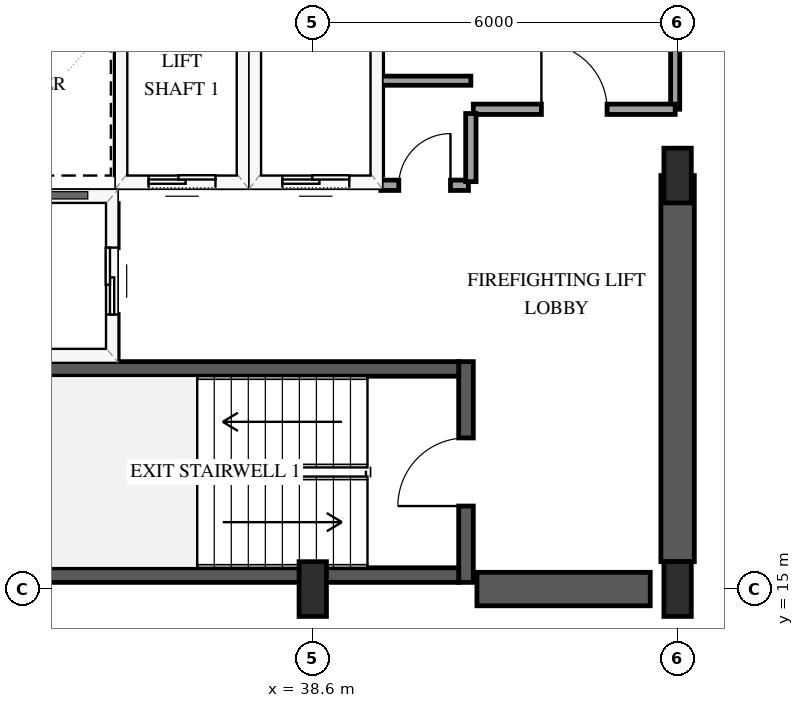
"""IFC4 building model, lengths in metres.
Left out: names, types, materials, properties, quantities, classifications, styles, units other than length and angle.
Written with IfcOpenShell. Run it as: python <this file> out.ifc"""

import sys

from ifc_helpers import new_model, si_unit, direction, frame, frame_2d, origin, origin_2d, place, context, subcontext, project, spatial, rectangle, extrude, element, fill, save


model = new_model("IFC4")
c1 = context("Model", 3, precision=1e-05, world=origin(), true_north=direction((0.0, 1.0)))
c2 = subcontext(c1, "Body", "Model", "MODEL_VIEW")
j1 = project(units=[si_unit("LENGTHUNIT", "METRE"), si_unit("PLANEANGLEUNIT", "RADIAN")], contexts=[c1])
p1 = place(None, origin())
s1 = spatial("IfcSite", under=j1, at=p1, CompositionType="ELEMENT")
p2 = place(p1, origin())
s2 = spatial("IfcBuilding", under=s1, at=p2, CompositionType="ELEMENT")
p3 = place(p2, frame((0.0, 0.0, 95.2)))
s3 = spatial("IfcBuildingStorey", under=s2, at=p3, CompositionType="ELEMENT", Elevation=95.2)
p4 = place(p3, frame((41.12, 15.11, 0.0), z_axis=(0.0, 0.0, 1.0), x_axis=(0.0, 1.0, 0.0)))
e1 = element("IfcWall", 1, at=p4, inside=s3, PredefinedType="SHEAR", context=c2, shape_type="SweptSolid", body=[
    extrude(rectangle(XDim=3.63, YDim=0.24, at=frame_2d((1.815, 0.0))), origin(), (0.0, 0.0, 1.0), 3.9),
])
p5 = place(p4, frame((1.255, 0.0, 0.0)))
e2 = element("IfcOpeningElement", 2, at=p5, cuts=e1, PredefinedType="OPENING", context=c2, shape_type="SweptSolid", body=[
    extrude(rectangle(XDim=1.12, YDim=2.15, at=frame_2d((0.56, 1.075))), frame((0.0, 0.13, 0.0), z_axis=(0.0, -1.0, 0.0), x_axis=(1.0, 0.0, 0.0)), (0.0, 0.0, 1.0), 0.26),
])
for number, where, z_axis, x_axis in (
    (3, (33.0, 15.23, 0.0), (0.0, 0.0, 1.0), (1.0, 0.0, 0.0)),
    (4, (33.0, 18.62, 0.0), (0.0, 0.0, 1.0), (1.0, 0.0, 0.0)),
):
    element("IfcWall", number, at=place(p3, frame(where, z_axis=z_axis, x_axis=x_axis)), inside=s3, PredefinedType="SHEAR", context=c2, shape_type="SweptSolid", body=[
        extrude(rectangle(XDim=8.0, YDim=0.24, at=frame_2d((4.0, 0.0))), origin(), (0.0, 0.0, 1.0), 3.9),
    ])
p6 = place(p3, frame((41.3, 15.0, 0.0), z_axis=(0.0, 0.0, 1.0), x_axis=(1.0, 0.0, 0.0)))
e5 = element("IfcWall", 5, at=p6, inside=s3, PredefinedType="SHEAR", context=c2, shape_type="SweptSolid", body=[
    extrude(rectangle(XDim=2.85, YDim=0.55, at=frame_2d((1.425, 0.0))), origin(), (0.0, 0.0, 1.0), 3.9),
])
p7 = place(p3, frame((44.6, 15.45, 0.0), z_axis=(0.0, 0.0, 1.0), x_axis=(0.0, 1.0, 0.0)))
e6 = element("IfcWall", 6, at=p7, inside=s3, PredefinedType="SHEAR", context=c2, shape_type="SweptSolid", body=[
    extrude(rectangle(XDim=6.35, YDim=0.55, at=frame_2d((3.175, 0.0))), origin(), (0.0, 0.0, 1.0), 3.9),
])
for number, where, z_axis, x_axis in (
    (7, (38.6, 15.0, 0.0), (0.0, 0.0, 1.0), (1.0, 0.0, 0.0)),
    (8, (44.6, 15.0, 0.0), (0.0, 0.0, 1.0), (1.0, 0.0, 0.0)),
    (9, (44.6, 21.8, 0.0), (0.0, 0.0, 1.0), (1.0, 0.0, 0.0)),
):
    element("IfcColumn", number, at=place(p3, frame(where, z_axis=z_axis, x_axis=x_axis)), inside=s3, PredefinedType="PILASTER", context=c2, shape_type="SweptSolid", body=[
        extrude(rectangle(XDim=0.45, YDim=0.9, at=origin_2d()), origin(), (0.0, 0.0, 1.0), 3.9),
    ])
p8 = place(p3, frame((35.45, 21.7, 0.0), z_axis=(0.0, 0.0, 1.0), x_axis=(1.0, 0.0, 0.0)))
e10 = element("IfcWall", 10, at=p8, inside=s3, PredefinedType="SOLIDWALL", context=c2, shape_type="SweptSolid", body=[
    extrude(rectangle(XDim=2.0, YDim=0.2, at=frame_2d((1.0, 0.0))), origin(), (0.0, 0.0, 1.0), 3.6),
])
p9 = place(p8, frame((0.45, 0.0, 0.0)))
e11 = element("IfcOpeningElement", 11, at=p9, cuts=e10, PredefinedType="OPENING", context=c2, shape_type="SweptSolid", body=[
    extrude(rectangle(XDim=1.1, YDim=2.15, at=frame_2d((0.55, 1.075))), frame((0.0, 0.11, 0.0), z_axis=(0.0, -1.0, 0.0), x_axis=(1.0, 0.0, 0.0)), (0.0, 0.0, 1.0), 0.22),
])
for number, where, z_axis, x_axis in (
    (12, (35.45, 21.81, 0.0), (0.0, 0.0, 1.0), (0.0, 1.0, 0.0)),
    (13, (37.45, 21.81, 0.0), (0.0, 0.0, 1.0), (0.0, 1.0, 0.0)),
):
    element("IfcWall", number, at=place(p3, frame(where, z_axis=z_axis, x_axis=x_axis)), inside=s3, PredefinedType="SOLIDWALL", context=c2, shape_type="SweptSolid", body=[
        extrude(rectangle(XDim=2.38, YDim=0.2, at=frame_2d((1.19, 0.0))), origin(), (0.0, 0.0, 1.0), 3.6),
    ])
p10 = place(p3, frame((37.65, 21.7, 0.0), z_axis=(0.0, 0.0, 1.0), x_axis=(1.0, 0.0, 0.0)))
e14 = element("IfcWall", 14, at=p10, inside=s3, PredefinedType="SOLIDWALL", context=c2, shape_type="SweptSolid", body=[
    extrude(rectangle(XDim=2.0, YDim=0.2, at=frame_2d((1.0, 0.0))), origin(), (0.0, 0.0, 1.0), 3.6),
])
p11 = place(p10, frame((0.45, 0.0, 0.0)))
e15 = element("IfcOpeningElement", 15, at=p11, cuts=e14, PredefinedType="OPENING", context=c2, shape_type="SweptSolid", body=[
    extrude(rectangle(XDim=1.1, YDim=2.15, at=frame_2d((0.55, 1.075))), frame((0.0, 0.11, 0.0), z_axis=(0.0, -1.0, 0.0), x_axis=(1.0, 0.0, 0.0)), (0.0, 0.0, 1.0), 0.22),
])
p12 = place(p3, frame((39.65, 21.81, 0.0), z_axis=(0.0, 0.0, 1.0), x_axis=(0.0, 1.0, 0.0)))
e16 = element("IfcWall", 16, at=p12, inside=s3, PredefinedType="SOLIDWALL", context=c2, shape_type="SweptSolid", body=[
    extrude(rectangle(XDim=2.38, YDim=0.2, at=frame_2d((1.19, 0.0))), origin(), (0.0, 0.0, 1.0), 3.6),
])
p13 = place(p3, frame((32.72, 21.45, 0.0), z_axis=(0.0, 0.0, 1.0), x_axis=(1.0, 0.0, 0.0)))
e17 = element("IfcWall", 17, at=p13, inside=s3, PredefinedType="SOLIDWALL", context=c2, shape_type="SweptSolid", body=[
    extrude(rectangle(XDim=2.58, YDim=0.2, at=frame_2d((1.29, 0.0))), origin(), (0.0, 0.0, 1.0), 3.6),
])
p14 = place(p3, frame((35.3, 18.79, 0.0), z_axis=(0.0, 0.0, 1.0), x_axis=(0.0, 1.0, 0.0)))
e18 = element("IfcWall", 18, at=p14, inside=s3, PredefinedType="SOLIDWALL", context=c2, shape_type="SweptSolid", body=[
    extrude(rectangle(XDim=2.55, YDim=0.2, at=frame_2d((1.275, 0.0))), origin(), (0.0, 0.0, 1.0), 3.6),
])
p15 = place(p14, frame((0.725, 0.0, 0.0)))
e19 = element("IfcOpeningElement", 19, at=p15, cuts=e18, PredefinedType="OPENING", context=c2, shape_type="SweptSolid", body=[
    extrude(rectangle(XDim=1.1, YDim=2.15, at=frame_2d((0.55, 1.075))), frame((0.0, 0.11, 0.0), z_axis=(0.0, -1.0, 0.0), x_axis=(1.0, 0.0, 0.0)), (0.0, 0.0, 1.0), 0.22),
])
p16 = place(p3, frame((44.56, 29.8, 0.0), z_axis=(0.0, 0.0, 1.0), x_axis=(0.0, -1.0, 0.0)))
e20 = element("IfcWall", 20, at=p16, inside=s3, PredefinedType="PARTITIONING", context=c2, shape_type="SweptSolid", body=[
    extrude(rectangle(XDim=6.91, YDim=0.15, at=frame_2d((3.455, 0.0))), origin(), (0.0, 0.0, 1.0), 2.64),
])
p17 = place(p16, frame((2.915, 0.0, 0.0)))
e21 = element("IfcOpeningElement", 21, at=p17, cuts=e20, PredefinedType="OPENING", context=c2, shape_type="SweptSolid", body=[
    extrude(rectangle(XDim=1.08, YDim=2.15, at=frame_2d((0.54, 1.075))), frame((0.0, 0.085, 0.0), z_axis=(0.0, -1.0, 0.0), x_axis=(1.0, 0.0, 0.0)), (0.0, 0.0, 1.0), 0.17),
])
p18 = place(p3, frame((41.24, 22.89, 0.0), z_axis=(0.0, 0.0, 1.0), x_axis=(1.0, 0.0, 0.0)))
e22 = element("IfcWall", 22, at=p18, inside=s3, PredefinedType="PARTITIONING", context=c2, shape_type="SweptSolid", body=[
    extrude(rectangle(XDim=3.32, YDim=0.17, at=frame_2d((1.66, 0.0))), origin(), (0.0, 0.0, 1.0), 3.6),
])
p19 = place(p18, frame((1.12, 0.0, 0.0)))
e23 = element("IfcOpeningElement", 23, at=p19, cuts=e22, PredefinedType="OPENING", context=c2, shape_type="SweptSolid", body=[
    extrude(rectangle(XDim=1.08, YDim=2.15, at=frame_2d((0.54, 1.075))), frame((0.0, 0.095, 0.0), z_axis=(0.0, -1.0, 0.0), x_axis=(1.0, 0.0, 0.0)), (0.0, 0.0, 1.0), 0.19),
])
p20 = place(p3, frame((39.72, 21.64, 0.0), z_axis=(0.0, 0.0, 1.0), x_axis=(1.0, 0.0, 0.0)))
e24 = element("IfcWall", 24, at=p20, inside=s3, PredefinedType="PARTITIONING", context=c2, shape_type="SweptSolid", body=[
    extrude(rectangle(XDim=1.44, YDim=0.17, at=frame_2d((0.72, 0.0))), origin(), (0.0, 0.0, 1.0), 3.6),
])
p21 = place(p20, frame((0.295, 0.0, 0.0)))
e25 = element("IfcOpeningElement", 25, at=p21, cuts=e24, PredefinedType="OPENING", context=c2, shape_type="SweptSolid", body=[
    extrude(rectangle(XDim=0.85, YDim=2.1, at=frame_2d((0.425, 1.05))), frame((0.0, 0.095, 0.0), z_axis=(0.0, -1.0, 0.0), x_axis=(1.0, 0.0, 0.0)), (0.0, 0.0, 1.0), 0.19),
])
p22 = place(p3, frame((41.2, 21.7, 0.0), z_axis=(0.0, 0.0, 1.0), x_axis=(0.0, 1.0, 0.0)))
e26 = element("IfcWall", 26, at=p22, inside=s3, PredefinedType="PARTITIONING", context=c2, shape_type="SweptSolid", body=[
    extrude(rectangle(XDim=1.12, YDim=0.17, at=frame_2d((0.56, 0.0))), origin(), (0.0, 0.0, 1.0), 3.6),
])
p23 = place(p3, frame((41.2, 23.36, 0.0), z_axis=(0.0, 0.0, 1.0), x_axis=(-1.0, 0.0, 0.0)))
e27 = element("IfcWall", 27, at=p23, inside=s3, PredefinedType="PARTITIONING", context=c2, shape_type="SweptSolid", body=[
    extrude(rectangle(XDim=1.48, YDim=0.15, at=frame_2d((0.74, 0.0))), origin(), (0.0, 0.0, 1.0), 3.6),
])
p24 = place(p9, origin())
e28 = element("IfcDoor", 28, at=p24, inside=s3, OperationType="SLIDING_TO_LEFT", PredefinedType="DOOR", context=c2, shape_type="SweptSolid", body=[
    extrude(rectangle(XDim=1.1, YDim=2.15, at=frame_2d((0.55, 1.075))), frame((0.0, 0.025, 0.0), z_axis=(0.0, -1.0, 0.0), x_axis=(1.0, 0.0, 0.0)), (0.0, 0.0, 1.0), 0.05),
])
fill(e11, e28)
p25 = place(p11, origin())
e29 = element("IfcDoor", 29, at=p25, inside=s3, OperationType="SLIDING_TO_LEFT", PredefinedType="DOOR", context=c2, shape_type="SweptSolid", body=[
    extrude(rectangle(XDim=1.1, YDim=2.15, at=frame_2d((0.55, 1.075))), frame((0.0, 0.025, 0.0), z_axis=(0.0, -1.0, 0.0), x_axis=(1.0, 0.0, 0.0)), (0.0, 0.0, 1.0), 0.05),
])
fill(e15, e29)
p26 = place(p15, origin())
e30 = element("IfcDoor", 30, at=p26, inside=s3, OperationType="SLIDING_TO_LEFT", PredefinedType="DOOR", context=c2, shape_type="SweptSolid", body=[
    extrude(rectangle(XDim=1.1, YDim=2.15, at=frame_2d((0.55, 1.075))), frame((0.0, 0.025, 0.0), z_axis=(0.0, -1.0, 0.0), x_axis=(1.0, 0.0, 0.0)), (0.0, 0.0, 1.0), 0.05),
])
fill(e19, e30)
p27 = place(p5, origin())
e31 = element("IfcDoor", 31, at=p27, inside=s3, OperationType="SINGLE_SWING_LEFT", PredefinedType="DOOR", context=c2, shape_type="SweptSolid", body=[
    extrude(rectangle(XDim=1.12, YDim=2.15, at=frame_2d((0.56, 1.075))), frame((0.0, 0.025, 0.0), z_axis=(0.0, -1.0, 0.0), x_axis=(1.0, 0.0, 0.0)), (0.0, 0.0, 1.0), 0.05),
])
fill(e2, e31)
p28 = place(p19, origin())
e32 = element("IfcDoor", 32, at=p28, inside=s3, OperationType="SINGLE_SWING_LEFT", PredefinedType="DOOR", context=c2, shape_type="SweptSolid", body=[
    extrude(rectangle(XDim=1.08, YDim=2.15, at=frame_2d((0.54, 1.075))), frame((0.0, 0.025, 0.0), z_axis=(0.0, -1.0, 0.0), x_axis=(1.0, 0.0, 0.0)), (0.0, 0.0, 1.0), 0.05),
])
fill(e23, e32)
p29 = place(p21, origin())
e33 = element("IfcDoor", 33, at=p29, inside=s3, OperationType="SINGLE_SWING_RIGHT", PredefinedType="DOOR", context=c2, shape_type="SweptSolid", body=[
    extrude(rectangle(XDim=0.85, YDim=2.1, at=frame_2d((0.425, 1.05))), frame((0.0, 0.025, 0.0), z_axis=(0.0, -1.0, 0.0), x_axis=(1.0, 0.0, 0.0)), (0.0, 0.0, 1.0), 0.05),
])
fill(e25, e33)
save(model, sys.argv[1])
